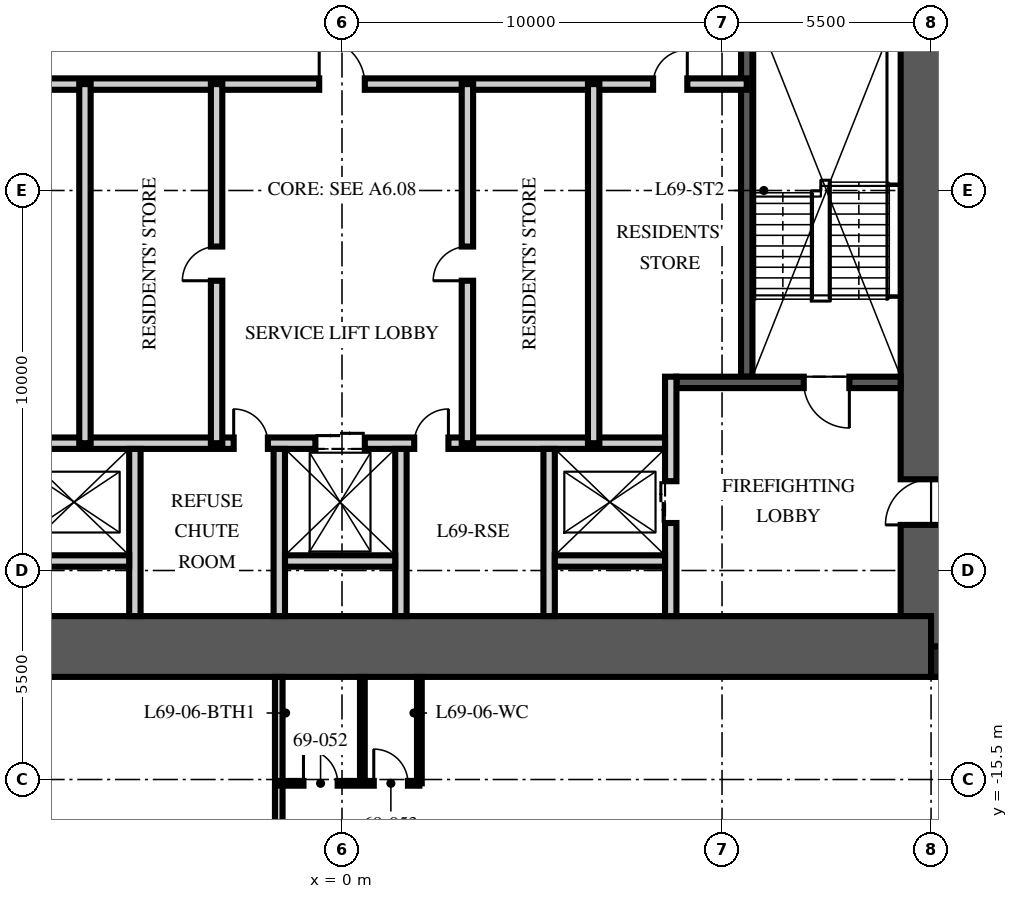
"""IFC4 building model, lengths in metres.
Left out: names, types, materials, properties, quantities, classifications, styles, units other than length and angle.
Written with IfcOpenShell. Run it as: python <this file> out.ifc"""

import sys

from ifc_helpers import new_model, si_unit, direction, frame, frame_2d, origin, origin_2d, place, context, subcontext, project, spatial, rectangle, extrude, element, fill, save


model = new_model("IFC4")
c1 = context("Model", 3, precision=1e-05, world=origin(), true_north=direction((0.0, 1.0)))
c2 = subcontext(c1, "Body", "Model", "MODEL_VIEW")
j1 = project(units=[si_unit("LENGTHUNIT", "METRE"), si_unit("PLANEANGLEUNIT", "RADIAN")], contexts=[c1])
p1 = place(None, origin())
s1 = spatial("IfcSite", under=j1, at=p1, CompositionType="ELEMENT")
p2 = place(p1, origin())
s2 = spatial("IfcBuilding", under=s1, at=p2, CompositionType="ELEMENT")
p3 = place(p2, frame((0.0, 0.0, 274.5)))
s3 = spatial("IfcBuildingStorey", under=s2, at=p3, CompositionType="ELEMENT", Elevation=274.5)
p4 = place(p3, frame((15.5, -12.0, -0.25), z_axis=(0.0, 0.0, 1.0), x_axis=(0.0, 1.0, 0.0)))
e1 = element("IfcWall", 1, at=p4, inside=s3, PredefinedType="SHEAR", context=c2, shape_type="SweptSolid", body=[
    extrude(rectangle(XDim=24.0, YDim=1.6, at=frame_2d((12.0, 0.0))), origin(), (0.0, 0.0, 1.0), 3.65),
])
p5 = place(p4, frame((3.2, 0.0, 0.25)))
e2 = element("IfcOpeningElement", 2, at=p5, cuts=e1, PredefinedType="OPENING", context=c2, shape_type="SweptSolid", body=[
    extrude(rectangle(XDim=1.2, YDim=2.1, at=frame_2d((0.6, 1.05))), frame((0.0, 0.81, 0.0), z_axis=(0.0, -1.0, 0.0), x_axis=(1.0, 0.0, 0.0)), (0.0, 0.0, 1.0), 1.62),
])
p6 = place(p4, frame((19.3, 0.0, 0.25)))
e3 = element("IfcOpeningElement", 3, at=p6, cuts=e1, PredefinedType="OPENING", context=c2, shape_type="SweptSolid", body=[
    extrude(rectangle(XDim=1.8, YDim=2.1, at=frame_2d((0.9, 1.05))), frame((0.0, 0.81, 0.0), z_axis=(0.0, -1.0, 0.0), x_axis=(1.0, 0.0, 0.0)), (0.0, 0.0, 1.0), 1.62),
])
p7 = place(p3, frame((-15.5, -12.0, -0.25), z_axis=(0.0, 0.0, 1.0), x_axis=(1.0, 0.0, 0.0)))
e4 = element("IfcWall", 4, at=p7, inside=s3, PredefinedType="SHEAR", context=c2, shape_type="SweptSolid", body=[
    extrude(rectangle(XDim=31.0, YDim=1.6, at=frame_2d((15.5, 0.0))), origin(), (0.0, 0.0, 1.0), 3.65),
])
p8 = place(p3, frame((15.9, -12.4, -0.25), z_axis=(0.0, 0.0, 1.0), x_axis=(1.0, 0.0, 0.0)))
e5 = element("IfcColumn", 5, at=p8, inside=s3, PredefinedType="COLUMN", context=c2, shape_type="SweptSolid", body=[
    extrude(rectangle(XDim=0.8, YDim=0.8, at=origin_2d()), origin(), (0.0, 0.0, 1.0), 3.65),
])
p9 = place(p3, frame((10.65, -4.9, 0.0), z_axis=(0.0, 0.0, 1.0), x_axis=(0.0, 1.0, 0.0)))
e6 = element("IfcWall", 6, at=p9, inside=s3, PredefinedType="SOLIDWALL", context=c2, shape_type="SweptSolid", body=[
    extrude(rectangle(XDim=10.1, YDim=0.3, at=frame_2d((5.05, 0.0))), origin(), (0.0, 0.0, 1.0), 3.4),
])
p10 = place(p3, frame((14.7, -5.05, 0.0), z_axis=(0.0, 0.0, 1.0), x_axis=(-1.0, 0.0, 0.0)))
e7 = element("IfcWall", 7, at=p10, inside=s3, PredefinedType="SOLIDWALL", context=c2, shape_type="SweptSolid", body=[
    extrude(rectangle(XDim=5.9, YDim=0.3, at=frame_2d((2.95, 0.0))), origin(), (0.0, 0.0, 1.0), 3.4),
])
p11 = place(p10, frame((1.35, 0.0, 0.0)))
e8 = element("IfcOpeningElement", 8, at=p11, cuts=e7, PredefinedType="OPENING", context=c2, shape_type="SweptSolid", body=[
    extrude(rectangle(XDim=1.2, YDim=2.1, at=frame_2d((0.6, 1.05))), frame((0.0, 0.16, 0.0), z_axis=(0.0, -1.0, 0.0), x_axis=(1.0, 0.0, 0.0)), (0.0, 0.0, 1.0), 0.32),
])
p12 = place(p3, frame((8.65, -11.2, 0.0), z_axis=(0.0, 0.0, 1.0), x_axis=(0.0, 1.0, 0.0)))
e9 = element("IfcWall", 9, at=p12, inside=s3, PredefinedType="PARTITIONING", context=c2, shape_type="SweptSolid", body=[
    extrude(rectangle(XDim=6.3, YDim=0.3, at=frame_2d((3.15, 0.0))), origin(), (0.0, 0.0, 1.0), 3.4),
])
p13 = place(p12, frame((2.45, 0.0, 0.0)))
e10 = element("IfcOpeningElement", 10, at=p13, cuts=e9, PredefinedType="OPENING", context=c2, shape_type="SweptSolid", body=[
    extrude(rectangle(XDim=1.1, YDim=2.1, at=frame_2d((0.55, 1.05))), frame((0.0, 0.16, 0.0), z_axis=(0.0, -1.0, 0.0), x_axis=(1.0, 0.0, 0.0)), (0.0, 0.0, 1.0), 0.32),
])
p14 = place(p3, frame((-8.5, -6.65, 0.0), z_axis=(0.0, 0.0, 1.0), x_axis=(1.0, 0.0, 0.0)))
e11 = element("IfcWall", 11, at=p14, inside=s3, PredefinedType="PARTITIONING", context=c2, shape_type="SweptSolid", body=[
    extrude(rectangle(XDim=17.0, YDim=0.3, at=frame_2d((8.5, 0.0))), origin(), (0.0, 0.0, 1.0), 3.4),
])
p15 = place(p14, frame((7.8, 0.0, 0.0)))
e12 = element("IfcOpeningElement", 12, at=p15, cuts=e11, PredefinedType="OPENING", context=c2, shape_type="SweptSolid", body=[
    extrude(rectangle(XDim=1.3, YDim=2.4, at=frame_2d((0.65, 1.2))), frame((0.0, 0.16, 0.0), z_axis=(0.0, -1.0, 0.0), x_axis=(1.0, 0.0, 0.0)), (0.0, 0.0, 1.0), 0.32),
])
p16 = place(p14, frame((5.65, 0.0, 0.0)))
e13 = element("IfcOpeningElement", 13, at=p16, cuts=e11, PredefinedType="OPENING", context=c2, shape_type="SweptSolid", body=[
    extrude(rectangle(XDim=0.9, YDim=2.1, at=frame_2d((0.45, 1.05))), frame((0.0, 0.16, 0.0), z_axis=(0.0, -1.0, 0.0), x_axis=(1.0, 0.0, 0.0)), (0.0, 0.0, 1.0), 0.32),
])
p17 = place(p14, frame((10.4, 0.0, 0.0)))
e14 = element("IfcOpeningElement", 14, at=p17, cuts=e11, PredefinedType="OPENING", context=c2, shape_type="SweptSolid", body=[
    extrude(rectangle(XDim=0.9, YDim=2.1, at=frame_2d((0.45, 1.05))), frame((0.0, 0.16, 0.0), z_axis=(0.0, -1.0, 0.0), x_axis=(1.0, 0.0, 0.0)), (0.0, 0.0, 1.0), 0.32),
])
for number, where, z_axis, x_axis in (
    (15, (-5.45, -11.2, 0.0), (0.0, 0.0, 1.0), (0.0, 1.0, 0.0)),
    (16, (-1.65, -11.2, 0.0), (0.0, 0.0, 1.0), (0.0, 1.0, 0.0)),
    (17, (1.55, -11.2, 0.0), (0.0, 0.0, 1.0), (0.0, 1.0, 0.0)),
    (18, (5.45, -11.2, 0.0), (0.0, 0.0, 1.0), (0.0, 1.0, 0.0)),
):
    element("IfcWall", number, at=place(p3, frame(where, z_axis=z_axis, x_axis=x_axis)), inside=s3, PredefinedType="PARTITIONING", context=c2, shape_type="SweptSolid", body=[
        extrude(rectangle(XDim=4.4, YDim=0.3, at=frame_2d((2.2, 0.0))), origin(), (0.0, 0.0, 1.0), 3.4),
    ])
for number, where, z_axis, x_axis in (
    (19, (-8.5, -9.75, 0.0), (0.0, 0.0, 1.0), (1.0, 0.0, 0.0)),
    (20, (-1.5, -9.75, 0.0), (0.0, 0.0, 1.0), (1.0, 0.0, 0.0)),
    (21, (5.6, -9.75, 0.0), (0.0, 0.0, 1.0), (1.0, 0.0, 0.0)),
):
    element("IfcWall", number, at=place(p3, frame(where, z_axis=z_axis, x_axis=x_axis)), inside=s3, PredefinedType="PARTITIONING", context=c2, shape_type="SweptSolid", body=[
        extrude(rectangle(XDim=2.9, YDim=0.3, at=frame_2d((1.45, 0.0))), origin(), (0.0, 0.0, 1.0), 3.4),
    ])
p18 = place(p3, frame((-10.65, 2.8, 0.0), z_axis=(0.0, 0.0, 1.0), x_axis=(1.0, 0.0, 0.0)))
e22 = element("IfcWall", 22, at=p18, inside=s3, PredefinedType="PARTITIONING", context=c2, shape_type="SweptSolid", body=[
    extrude(rectangle(XDim=21.3, YDim=0.3, at=frame_2d((10.65, 0.0))), origin(), (0.0, 0.0, 1.0), 3.4),
])
p19 = place(p18, frame((10.05, 0.0, 0.0)))
e23 = element("IfcOpeningElement", 23, at=p19, cuts=e22, PredefinedType="OPENING", context=c2, shape_type="SweptSolid", body=[
    extrude(rectangle(XDim=1.2, YDim=2.1, at=frame_2d((0.6, 1.05))), frame((0.0, 0.16, 0.0), z_axis=(0.0, -1.0, 0.0), x_axis=(1.0, 0.0, 0.0)), (0.0, 0.0, 1.0), 0.32),
])
p20 = place(p18, frame((1.493, 0.0, 0.0)))
e24 = element("IfcOpeningElement", 24, at=p20, cuts=e22, PredefinedType="OPENING", context=c2, shape_type="SweptSolid", body=[
    extrude(rectangle(XDim=0.9, YDim=2.1, at=frame_2d((0.45, 1.05))), frame((0.0, 0.16, 0.0), z_axis=(0.0, -1.0, 0.0), x_axis=(1.0, 0.0, 0.0)), (0.0, 0.0, 1.0), 0.32),
])
p21 = place(p18, frame((18.836, 0.0, 0.0)))
e25 = element("IfcOpeningElement", 25, at=p21, cuts=e22, PredefinedType="OPENING", context=c2, shape_type="SweptSolid", body=[
    extrude(rectangle(XDim=0.9, YDim=2.1, at=frame_2d((0.45, 1.05))), frame((0.0, 0.16, 0.0), z_axis=(0.0, -1.0, 0.0), x_axis=(1.0, 0.0, 0.0)), (0.0, 0.0, 1.0), 0.32),
])
p22 = place(p3, frame((-3.3, -6.65, 0.0), z_axis=(0.0, 0.0, 1.0), x_axis=(0.0, 1.0, 0.0)))
e26 = element("IfcWall", 26, at=p22, inside=s3, PredefinedType="PARTITIONING", context=c2, shape_type="SweptSolid", body=[
    extrude(rectangle(XDim=9.45, YDim=0.3, at=frame_2d((4.725, 0.0))), origin(), (0.0, 0.0, 1.0), 3.4),
])
p23 = place(p22, frame((4.275, 0.0, 0.0)))
e27 = element("IfcOpeningElement", 27, at=p23, cuts=e26, PredefinedType="OPENING", context=c2, shape_type="SweptSolid", body=[
    extrude(rectangle(XDim=0.9, YDim=2.1, at=frame_2d((0.45, 1.05))), frame((0.0, 0.16, 0.0), z_axis=(0.0, -1.0, 0.0), x_axis=(1.0, 0.0, 0.0)), (0.0, 0.0, 1.0), 0.32),
])
p24 = place(p3, frame((3.3, -6.65, 0.0), z_axis=(0.0, 0.0, 1.0), x_axis=(0.0, 1.0, 0.0)))
e28 = element("IfcWall", 28, at=p24, inside=s3, PredefinedType="PARTITIONING", context=c2, shape_type="SweptSolid", body=[
    extrude(rectangle(XDim=9.45, YDim=0.3, at=frame_2d((4.725, 0.0))), origin(), (0.0, 0.0, 1.0), 3.4),
])
p25 = place(p24, frame((4.275, 0.0, 0.0)))
e29 = element("IfcOpeningElement", 29, at=p25, cuts=e28, PredefinedType="OPENING", context=c2, shape_type="SweptSolid", body=[
    extrude(rectangle(XDim=0.9, YDim=2.1, at=frame_2d((0.45, 1.05))), frame((0.0, 0.16, 0.0), z_axis=(0.0, -1.0, 0.0), x_axis=(1.0, 0.0, 0.0)), (0.0, 0.0, 1.0), 0.32),
])
for number, where, z_axis, x_axis in (
    (30, (-6.764, -6.65, 0.0), (0.0, 0.0, 1.0), (0.0, 1.0, 0.0)),
    (31, (6.622, -6.65, 0.0), (0.0, 0.0, 1.0), (0.0, 1.0, 0.0)),
):
    element("IfcWall", number, at=place(p3, frame(where, z_axis=z_axis, x_axis=x_axis)), inside=s3, PredefinedType="PARTITIONING", context=c2, shape_type="SweptSolid", body=[
        extrude(rectangle(XDim=9.45, YDim=0.3, at=frame_2d((4.725, 0.0))), origin(), (0.0, 0.0, 1.0), 3.4),
    ])
p26 = place(p3, frame((-1.664, -12.8, 0.0), z_axis=(0.0, 0.0, 1.0), x_axis=(0.0, -1.0, 0.0)))
e32 = element("IfcWall", 32, at=p26, inside=s3, PredefinedType="PARTITIONING", context=c2, shape_type="SweptSolid", body=[
    extrude(rectangle(XDim=12.65, YDim=0.2, at=frame_2d((6.325, 0.0))), origin(), (0.0, 0.0, 1.0), 2.75),
])
p27 = place(p3, frame((-1.664, -15.6, 0.0), z_axis=(0.0, 0.0, 1.0), x_axis=(1.0, 0.0, 0.0)))
e33 = element("IfcWall", 33, at=p27, inside=s3, PredefinedType="PARTITIONING", context=c2, shape_type="SweptSolid", body=[
    extrude(rectangle(XDim=3.7, YDim=0.125, at=frame_2d((1.85, 0.0))), origin(), (0.0, 0.0, 1.0), 2.2),
])
p28 = place(p27, frame((0.65, 0.0, 0.0)))
e34 = element("IfcOpeningElement", 34, at=p28, cuts=e33, PredefinedType="OPENING", context=c2, shape_type="SweptSolid", body=[
    extrude(rectangle(XDim=0.9, YDim=2.1, at=frame_2d((0.45, 1.05))), frame((0.0, 0.073, 0.0), z_axis=(0.0, -1.0, 0.0), x_axis=(1.0, 0.0, 0.0)), (0.0, 0.0, 1.0), 0.145),
])
p29 = place(p27, frame((2.5, 0.0, 0.0)))
e35 = element("IfcOpeningElement", 35, at=p29, cuts=e33, PredefinedType="OPENING", context=c2, shape_type="SweptSolid", body=[
    extrude(rectangle(XDim=0.9, YDim=2.1, at=frame_2d((0.45, 1.05))), frame((0.0, 0.073, 0.0), z_axis=(0.0, -1.0, 0.0), x_axis=(1.0, 0.0, 0.0)), (0.0, 0.0, 1.0), 0.145),
])
p30 = place(p3, frame((0.536, -12.8, 0.0), z_axis=(0.0, 0.0, 1.0), x_axis=(0.0, -1.0, 0.0)))
e36 = element("IfcWall", 36, at=p30, inside=s3, PredefinedType="PARTITIONING", context=c2, shape_type="SweptSolid", body=[
    extrude(rectangle(XDim=2.8, YDim=0.125, at=frame_2d((1.4, 0.0))), origin(), (0.0, 0.0, 1.0), 2.2),
])
p31 = place(p3, frame((2.036, -12.8, 0.0), z_axis=(0.0, 0.0, 1.0), x_axis=(0.0, -1.0, 0.0)))
e37 = element("IfcWall", 37, at=p31, inside=s3, PredefinedType="PARTITIONING", context=c2, shape_type="SweptSolid", body=[
    extrude(rectangle(XDim=2.8, YDim=0.125, at=frame_2d((1.4, 0.0))), origin(), (0.0, 0.0, 1.0), 3.4),
])
p32 = place(p11, origin())
e38 = element("IfcDoor", 38, at=p32, inside=s3, OperationType="SINGLE_SWING_LEFT", PredefinedType="DOOR", context=c2, shape_type="SweptSolid", body=[
    extrude(rectangle(XDim=1.2, YDim=2.1, at=frame_2d((0.6, 1.05))), frame((0.0, 0.025, 0.0), z_axis=(0.0, -1.0, 0.0), x_axis=(1.0, 0.0, 0.0)), (0.0, 0.0, 1.0), 0.05),
])
fill(e8, e38)
p33 = place(p5, origin())
e39 = element("IfcDoor", 39, at=p33, inside=s3, OperationType="SINGLE_SWING_LEFT", PredefinedType="DOOR", context=c2, shape_type="SweptSolid", body=[
    extrude(rectangle(XDim=1.2, YDim=2.1, at=frame_2d((0.6, 1.05))), frame((0.0, 0.025, 0.0), z_axis=(0.0, -1.0, 0.0), x_axis=(1.0, 0.0, 0.0)), (0.0, 0.0, 1.0), 0.05),
])
fill(e2, e39)
p34 = place(p13, origin())
e40 = element("IfcDoor", 40, at=p34, inside=s3, OperationType="DOUBLE_DOOR_SLIDING", PredefinedType="DOOR", context=c2, shape_type="SweptSolid", body=[
    extrude(rectangle(XDim=1.1, YDim=2.1, at=frame_2d((0.55, 1.05))), frame((0.0, 0.025, 0.0), z_axis=(0.0, -1.0, 0.0), x_axis=(1.0, 0.0, 0.0)), (0.0, 0.0, 1.0), 0.05),
])
fill(e10, e40)
p35 = place(p15, origin())
e41 = element("IfcDoor", 41, at=p35, inside=s3, OperationType="DOUBLE_DOOR_SLIDING", PredefinedType="DOOR", context=c2, shape_type="SweptSolid", body=[
    extrude(rectangle(XDim=1.3, YDim=2.4, at=frame_2d((0.65, 1.2))), frame((0.0, 0.025, 0.0), z_axis=(0.0, -1.0, 0.0), x_axis=(1.0, 0.0, 0.0)), (0.0, 0.0, 1.0), 0.05),
])
fill(e12, e41)
p36 = place(p19, origin())
e42 = element("IfcDoor", 42, at=p36, inside=s3, OperationType="SINGLE_SWING_LEFT", PredefinedType="DOOR", context=c2, shape_type="SweptSolid", body=[
    extrude(rectangle(XDim=1.2, YDim=2.1, at=frame_2d((0.6, 1.05))), frame((0.0, 0.025, 0.0), z_axis=(0.0, -1.0, 0.0), x_axis=(1.0, 0.0, 0.0)), (0.0, 0.0, 1.0), 0.05),
])
fill(e23, e42)
p37 = place(p16, origin())
e43 = element("IfcDoor", 43, at=p37, inside=s3, OperationType="SINGLE_SWING_LEFT", PredefinedType="DOOR", context=c2, shape_type="SweptSolid", body=[
    extrude(rectangle(XDim=0.9, YDim=2.1, at=frame_2d((0.45, 1.05))), frame((0.0, 0.025, 0.0), z_axis=(0.0, -1.0, 0.0), x_axis=(1.0, 0.0, 0.0)), (0.0, 0.0, 1.0), 0.05),
])
fill(e13, e43)
p38 = place(p17, origin())
e44 = element("IfcDoor", 44, at=p38, inside=s3, OperationType="SINGLE_SWING_RIGHT", PredefinedType="DOOR", context=c2, shape_type="SweptSolid", body=[
    extrude(rectangle(XDim=0.9, YDim=2.1, at=frame_2d((0.45, 1.05))), frame((0.0, 0.025, 0.0), z_axis=(0.0, -1.0, 0.0), x_axis=(1.0, 0.0, 0.0)), (0.0, 0.0, 1.0), 0.05),
])
fill(e14, e44)
p39 = place(p23, origin())
e45 = element("IfcDoor", 45, at=p39, inside=s3, OperationType="SINGLE_SWING_LEFT", PredefinedType="DOOR", context=c2, shape_type="SweptSolid", body=[
    extrude(rectangle(XDim=0.9, YDim=2.1, at=frame_2d((0.45, 1.05))), frame((0.0, 0.025, 0.0), z_axis=(0.0, -1.0, 0.0), x_axis=(1.0, 0.0, 0.0)), (0.0, 0.0, 1.0), 0.05),
])
fill(e27, e45)
p40 = place(p25, origin())
e46 = element("IfcDoor", 46, at=p40, inside=s3, OperationType="SINGLE_SWING_LEFT", PredefinedType="DOOR", context=c2, shape_type="SweptSolid", body=[
    extrude(rectangle(XDim=0.9, YDim=2.1, at=frame_2d((0.45, 1.05))), frame((0.0, 0.025, 0.0), z_axis=(0.0, -1.0, 0.0), x_axis=(1.0, 0.0, 0.0)), (0.0, 0.0, 1.0), 0.05),
])
fill(e29, e46)
p41 = place(p21, origin())
e47 = element("IfcDoor", 47, at=p41, inside=s3, OperationType="SINGLE_SWING_RIGHT", PredefinedType="DOOR", context=c2, shape_type="SweptSolid", body=[
    extrude(rectangle(XDim=0.9, YDim=2.1, at=frame_2d((0.45, 1.05))), frame((0.0, 0.025, 0.0), z_axis=(0.0, -1.0, 0.0), x_axis=(1.0, 0.0, 0.0)), (0.0, 0.0, 1.0), 0.05),
])
fill(e25, e47)
p42 = place(p28, origin())
e48 = element("IfcDoor", 48, at=p42, inside=s3, OperationType="SINGLE_SWING_LEFT", PredefinedType="DOOR", context=c2, shape_type="SweptSolid", body=[
    extrude(rectangle(XDim=0.9, YDim=2.1, at=frame_2d((0.45, 1.05))), frame((0.0, 0.025, 0.0), z_axis=(0.0, -1.0, 0.0), x_axis=(1.0, 0.0, 0.0)), (0.0, 0.0, 1.0), 0.05),
])
fill(e34, e48)
p43 = place(p29, origin())
e49 = element("IfcDoor", 49, at=p43, inside=s3, OperationType="SINGLE_SWING_LEFT", PredefinedType="DOOR", context=c2, shape_type="SweptSolid", body=[
    extrude(rectangle(XDim=0.9, YDim=2.1, at=frame_2d((0.45, 1.05))), frame((0.0, 0.025, 0.0), z_axis=(0.0, -1.0, 0.0), x_axis=(1.0, 0.0, 0.0)), (0.0, 0.0, 1.0), 0.05),
])
fill(e35, e49)
save(model, sys.argv[1])
